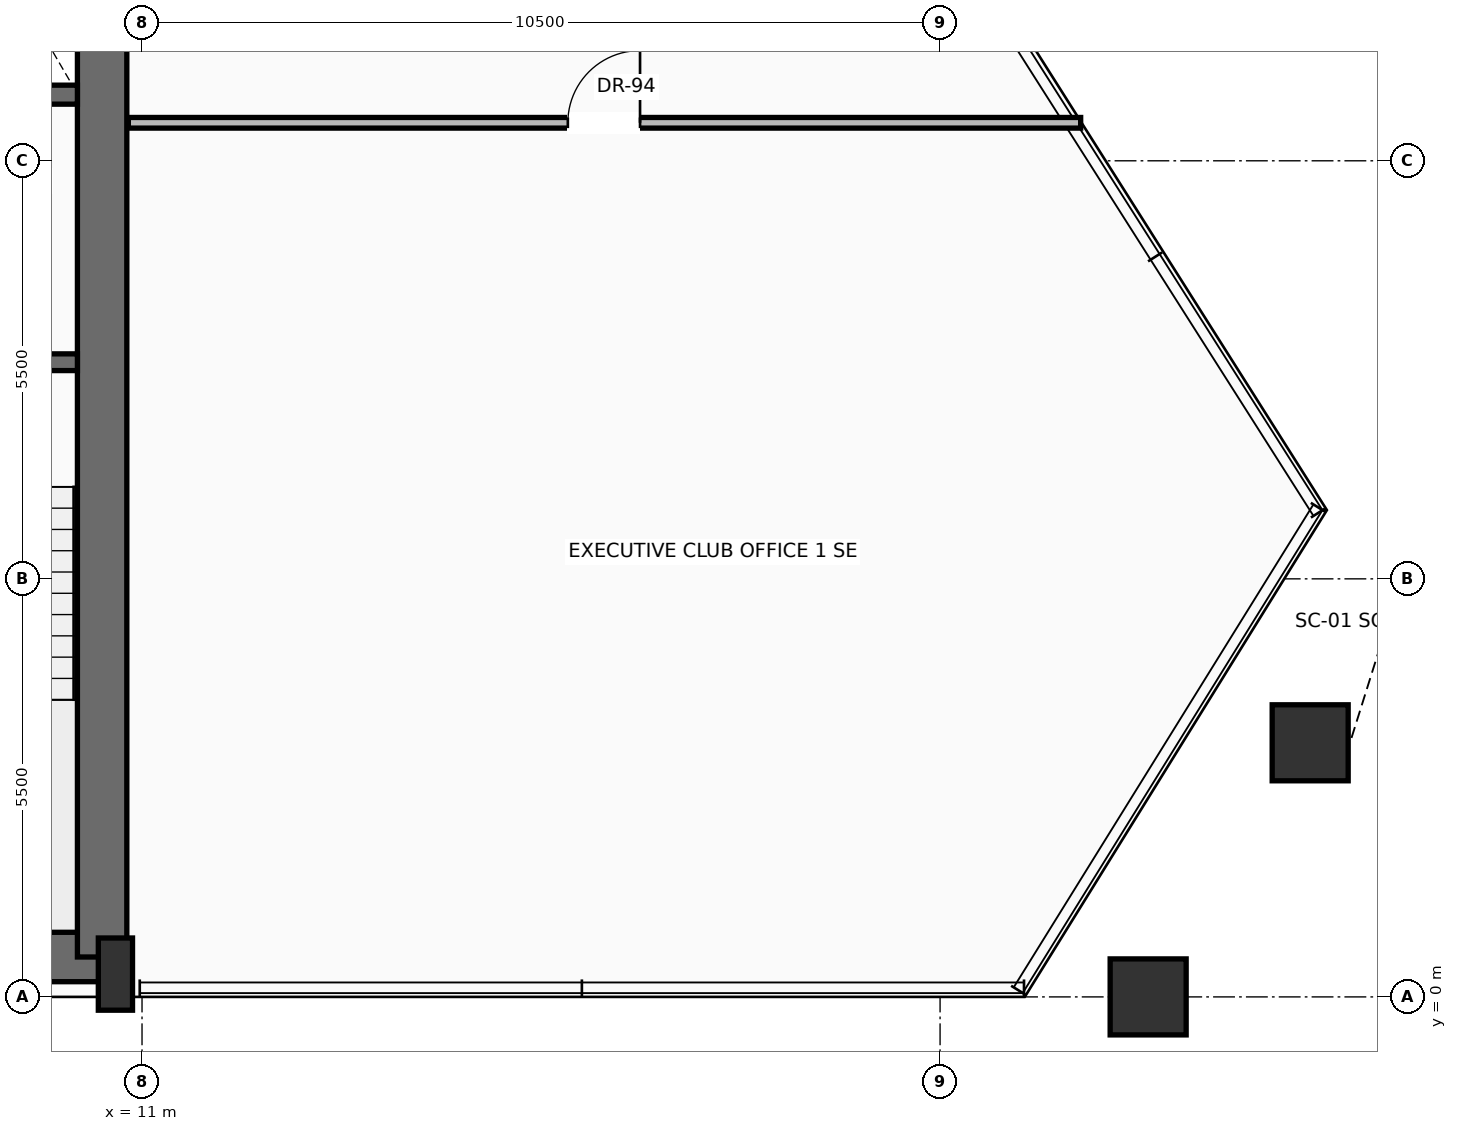
"""IFC4 building model, lengths in metres.
Left out: names, types, materials, properties, quantities, classifications, styles, units other than length and angle.
Written with IfcOpenShell. Run it as: python <this file> out.ifc"""

import sys

from ifc_helpers import new_model, si_unit, direction, frame, frame_2d, origin, origin_2d, place, context, subcontext, project, spatial, rectangle, hollow_rectangle, extrude, source, transform, mapped, element, fill, save


model = new_model("IFC4")
c1 = context("Model", 3, precision=1e-05, world=origin(), true_north=direction((0.0, 1.0)))
c2 = subcontext(c1, "Body", "Model", "MODEL_VIEW")
j1 = project(units=[si_unit("LENGTHUNIT", "METRE"), si_unit("PLANEANGLEUNIT", "RADIAN")], contexts=[c1])
p1 = place(None, origin())
s1 = spatial("IfcSite", under=j1, at=p1, CompositionType="ELEMENT")
p2 = place(p1, origin())
s2 = spatial("IfcBuilding", under=s1, at=p2, CompositionType="ELEMENT")
p3 = place(p2, frame((0.0, 0.0, 185.8)))
s3 = spatial("IfcBuildingStorey", under=s2, at=p3, CompositionType="ELEMENT", Elevation=185.8)
p4 = place(p3, frame((-10.65, 0.525, 0.0), z_axis=(0.0, 0.0, 1.0), x_axis=(1.0, 0.0, 0.0)))
e1 = element("IfcWall", 1, at=p4, inside=s3, PredefinedType="SHEAR", context=c2, shape_type="SweptSolid", body=[
    extrude(rectangle(XDim=21.3, YDim=0.65, at=frame_2d((10.65, 0.0))), origin(), (0.0, 0.0, 1.0), 3.47),
])
p5 = place(p3, frame((10.475, 0.525, 0.0), z_axis=(0.0, 0.0, 1.0), x_axis=(0.0, 1.0, 0.0)))
e2 = element("IfcWall", 2, at=p5, inside=s3, PredefinedType="SHEAR", context=c2, shape_type="SweptSolid", body=[
    extrude(rectangle(XDim=15.55, YDim=0.65, at=frame_2d((7.775, 0.0))), origin(), (0.0, 0.0, 1.0), 3.47),
])
m1 = source(origin(), c2, "Body", "SweptSolid", [
    extrude(rectangle(XDim=0.45, YDim=0.95, at=origin_2d()), origin(), (0.0, 0.0, 1.0), 3.7),
])
p6 = place(p3, frame((10.65, 0.3, 0.0), z_axis=(0.0, 0.0, 1.0), x_axis=(1.0, 0.0, 0.0)))
e3 = element("IfcColumn", 3, at=p6, inside=s3, PredefinedType="PILASTER", context=c2, shape_type="MappedRepresentation", body=[
    mapped(m1, transform((0.0, 0.0, 0.0), scale=1.0)),
])
m2 = source(origin(), c2, "Body", "SweptSolid", [
    extrude(hollow_rectangle(XDim=1.0, YDim=1.0, WallThickness=0.05, at=origin_2d()), origin(), (0.0, 0.0, 1.0), 3.691),
])
p7 = place(p3, frame((24.238, 0.0, 0.004), z_axis=(0.005357420303, 0.0, 0.999985648921), x_axis=(0.0, 1.0, 0.0)))
e4 = element("IfcColumn", 4, at=p7, inside=s3, PredefinedType="COLUMN", context=c2, shape_type="MappedRepresentation", body=[
    mapped(m2, transform((0.0, 0.0, 0.0), scale=1.0)),
])
m3 = source(origin(), c2, "Body", "SweptSolid", [
    extrude(hollow_rectangle(XDim=1.0, YDim=1.0, WallThickness=0.05, at=origin_2d()), origin(), (0.0, 0.0, 1.0), 3.692),
])
p8 = place(p3, frame((26.369, 3.343, 0.004), z_axis=(-0.005952033366, -0.014615548598, 0.999875471765), x_axis=(0.926146582901, -0.377163766792, 0.0)))
e5 = element("IfcColumn", 5, at=p8, inside=s3, PredefinedType="COLUMN", context=c2, shape_type="MappedRepresentation", body=[
    mapped(m3, transform((0.0, 0.0, 0.0), scale=1.0)),
])
p9 = place(p3, frame((10.15, 8.35, 0.0), z_axis=(0.0, 0.0, 1.0), x_axis=(-1.0, 0.0, 0.0)))
e6 = element("IfcWall", 6, at=p9, inside=s3, PredefinedType="SOLIDWALL", context=c2, shape_type="SweptSolid", body=[
    extrude(rectangle(XDim=4.65, YDim=0.22, at=frame_2d((2.325, 0.0))), origin(), (0.0, 0.0, 1.0), 3.47),
])
p10 = place(p9, frame((1.0, 0.0, 0.0)))
e7 = element("IfcOpeningElement", 7, at=p10, cuts=e6, PredefinedType="OPENING", context=c2, shape_type="SweptSolid", body=[
    extrude(rectangle(XDim=1.15, YDim=2.2, at=frame_2d((0.575, 1.1))), frame((0.0, 0.12, 0.0), z_axis=(0.0, -1.0, 0.0), x_axis=(1.0, 0.0, 0.0)), (0.0, 0.0, 1.0), 0.24),
])
p11 = place(p3, frame((10.15, 11.87, 0.0), z_axis=(0.0, 0.0, 1.0), x_axis=(-1.0, 0.0, 0.0)))
e8 = element("IfcWall", 8, at=p11, inside=s3, PredefinedType="SOLIDWALL", context=c2, shape_type="SweptSolid", body=[
    extrude(rectangle(XDim=4.65, YDim=0.25, at=frame_2d((2.325, 0.0))), origin(), (0.0, 0.0, 1.0), 3.47),
])
p12 = place(p11, frame((0.5, 0.0, 0.0)))
e9 = element("IfcOpeningElement", 9, at=p12, cuts=e8, PredefinedType="OPENING", context=c2, shape_type="SweptSolid", body=[
    extrude(rectangle(XDim=1.2, YDim=2.25, at=frame_2d((0.6, 1.125))), frame((0.0, 0.135, 0.0), z_axis=(0.0, -1.0, 0.0), x_axis=(1.0, 0.0, 0.0)), (0.0, 0.0, 1.0), 0.27),
])
p13 = place(p3, frame((10.82, 11.5, 0.0), z_axis=(0.0, 0.0, 1.0), x_axis=(1.0, 0.0, 0.0)))
e10 = element("IfcWall", 10, at=p13, inside=s3, PredefinedType="PARTITIONING", context=c2, shape_type="SweptSolid", body=[
    extrude(rectangle(XDim=12.53, YDim=0.14, at=frame_2d((6.265, 0.0))), origin(), (0.0, 0.0, 1.0), 3.462),
])
p14 = place(p13, frame((5.782, 0.0, 0.0)))
e11 = element("IfcOpeningElement", 11, at=p14, cuts=e10, PredefinedType="OPENING", context=c2, shape_type="SweptSolid", body=[
    extrude(rectangle(XDim=0.95, YDim=2.2, at=frame_2d((0.475, 1.1))), frame((0.0, 0.08, 0.0), z_axis=(0.0, -1.0, 0.0), x_axis=(1.0, 0.0, 0.0)), (0.0, 0.0, 1.0), 0.16),
])
m4 = source(origin(), c2, "Body", "SweptSolid", [
    extrude(rectangle(XDim=0.95, YDim=2.2, at=frame_2d((0.475, 1.1))), frame((0.0, 0.025, 0.0), z_axis=(0.0, -1.0, 0.0), x_axis=(1.0, 0.0, 0.0)), (0.0, 0.0, 1.0), 0.05),
])
p15 = place(p14, origin())
e12 = element("IfcDoor", 12, at=p15, inside=s3, OperationType="SINGLE_SWING_RIGHT", PredefinedType="DOOR", context=c2, shape_type="MappedRepresentation", body=[
    mapped(m4, transform((0.0, 0.0, 0.0), scale=1.0)),
])
fill(e11, e12)
save(model, sys.argv[1])
